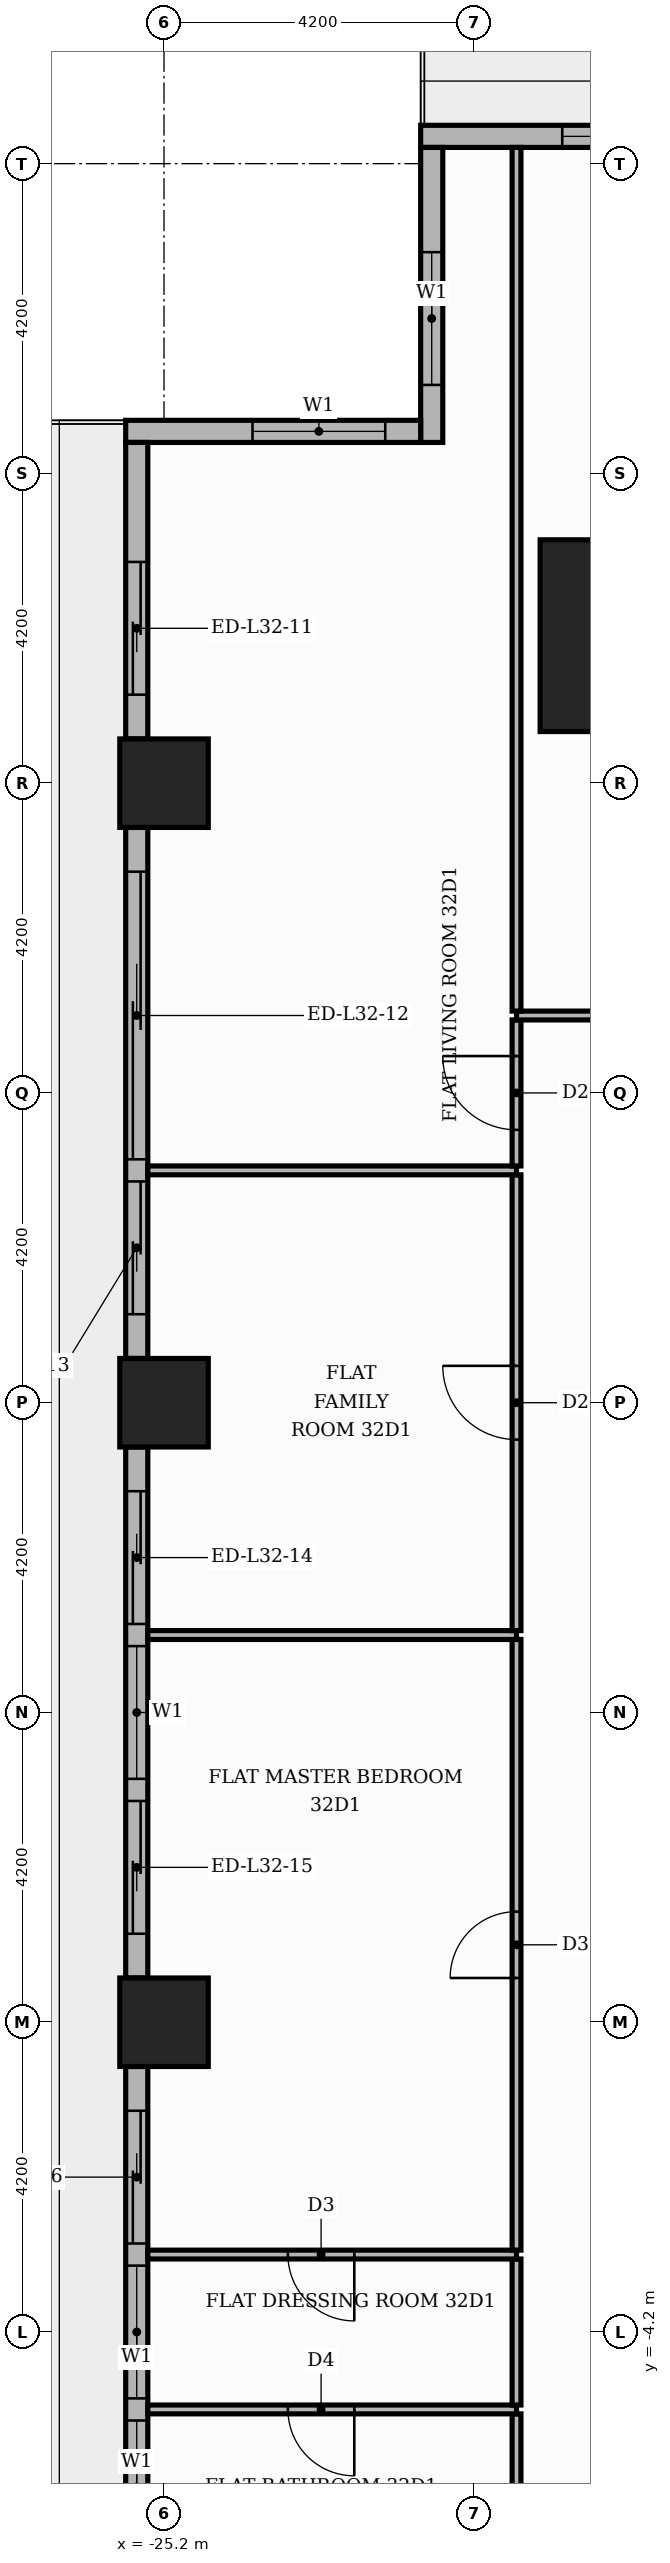
"""IFC4 building model, lengths in metres.
Left out: names, types, materials, properties, quantities, classifications, styles, units other than length and angle.
Written with IfcOpenShell. Run it as: python <this file> out.ifc"""

import sys

from ifc_helpers import new_model, si_unit, direction, frame, frame_2d, origin, origin_2d, place, context, subcontext, project, spatial, rectangle, extrude, element, fill, save


model = new_model("IFC4")
c1 = context("Model", 3, precision=1e-05, world=origin(), true_north=direction((0.0, 1.0)))
c2 = subcontext(c1, "Body", "Model", "MODEL_VIEW")
j1 = project(units=[si_unit("LENGTHUNIT", "METRE"), si_unit("PLANEANGLEUNIT", "RADIAN")], contexts=[c1])
p1 = place(None, origin())
s1 = spatial("IfcSite", under=j1, at=p1, CompositionType="ELEMENT")
p2 = place(p1, origin())
s2 = spatial("IfcBuilding", under=s1, at=p2, CompositionType="ELEMENT")
p3 = place(p2, frame((0.0, 0.0, 137.7)))
s3 = spatial("IfcBuildingStorey", under=s2, at=p3, CompositionType="ELEMENT", Elevation=137.7)
p4 = place(p3, frame((-18.8, 18.8, 0.0), z_axis=(0.0, 0.0, 1.0), x_axis=(1.0, 0.0, 0.0)))
e1 = element("IfcColumn", 1, at=p4, inside=s3, PredefinedType="COLUMN", context=c2, shape_type="SweptSolid", body=[
    extrude(rectangle(XDim=2.6, YDim=2.6, at=origin_2d()), origin(), (0.0, 0.0, 1.0), 3.9),
])
for number, where, z_axis, x_axis in (
    (2, (-25.2, 0.0, 0.0), (0.0, 0.0, 1.0), (1.0, 0.0, 0.0)),
    (3, (-25.2, 8.4, 0.0), (0.0, 0.0, 1.0), (1.0, 0.0, 0.0)),
    (4, (-25.2, 16.8, 0.0), (0.0, 0.0, 1.0), (1.0, 0.0, 0.0)),
):
    element("IfcColumn", number, at=place(p3, frame(where, z_axis=z_axis, x_axis=x_axis)), inside=s3, PredefinedType="COLUMN", context=c2, shape_type="SweptSolid", body=[
        extrude(rectangle(XDim=1.2, YDim=1.2, at=origin_2d()), origin(), (0.0, 0.0, 1.0), 3.9),
    ])
p5 = place(p3, frame((-17.4, 25.57, 0.0), z_axis=(0.0, 0.0, 1.0), x_axis=(-1.0, 0.0, 0.0)))
e5 = element("IfcWall", 5, at=p5, inside=s3, PredefinedType="STANDARD", context=c2, shape_type="SweptSolid", body=[
    extrude(rectangle(XDim=4.32, YDim=0.3, at=frame_2d((2.16, 0.0))), origin(), (0.0, 0.0, 1.0), 3.48),
])
p6 = place(p5, frame((0.6, 0.0, 0.9)))
e6 = element("IfcOpeningElement", 6, at=p6, cuts=e5, PredefinedType="OPENING", context=c2, shape_type="SweptSolid", body=[
    extrude(rectangle(XDim=1.8, YDim=2.1, at=frame_2d((0.9, 1.05))), frame((0.0, 0.16, 0.0), z_axis=(0.0, -1.0, 0.0), x_axis=(1.0, 0.0, 0.0)), (0.0, 0.0, 1.0), 0.32),
])
p7 = place(p3, frame((-21.57, 25.42, 0.0), z_axis=(0.0, 0.0, 1.0), x_axis=(0.0, -1.0, 0.0)))
e7 = element("IfcWall", 7, at=p7, inside=s3, PredefinedType="STANDARD", context=c2, shape_type="SweptSolid", body=[
    extrude(rectangle(XDim=4.0, YDim=0.3, at=frame_2d((2.0, 0.0))), origin(), (0.0, 0.0, 1.0), 3.48),
])
p8 = place(p7, frame((1.42, 0.0, 0.9)))
e8 = element("IfcOpeningElement", 8, at=p8, cuts=e7, PredefinedType="OPENING", context=c2, shape_type="SweptSolid", body=[
    extrude(rectangle(XDim=1.8, YDim=2.1, at=frame_2d((0.9, 1.05))), frame((0.0, 0.16, 0.0), z_axis=(0.0, -1.0, 0.0), x_axis=(1.0, 0.0, 0.0)), (0.0, 0.0, 1.0), 0.32),
])
p9 = place(p3, frame((-21.72, 21.57, 0.0), z_axis=(0.0, 0.0, 1.0), x_axis=(-1.0, 0.0, 0.0)))
e9 = element("IfcWall", 9, at=p9, inside=s3, PredefinedType="STANDARD", context=c2, shape_type="SweptSolid", body=[
    extrude(rectangle(XDim=4.0, YDim=0.3, at=frame_2d((2.0, 0.0))), origin(), (0.0, 0.0, 1.0), 3.48),
])
p10 = place(p9, frame((0.48, 0.0, 0.9)))
e10 = element("IfcOpeningElement", 10, at=p10, cuts=e9, PredefinedType="OPENING", context=c2, shape_type="SweptSolid", body=[
    extrude(rectangle(XDim=1.8, YDim=2.1, at=frame_2d((0.9, 1.05))), frame((0.0, 0.16, 0.0), z_axis=(0.0, -1.0, 0.0), x_axis=(1.0, 0.0, 0.0)), (0.0, 0.0, 1.0), 0.32),
])
p11 = place(p3, frame((-25.57, 21.42, 0.0), z_axis=(0.0, 0.0, 1.0), x_axis=(0.0, -1.0, 0.0)))
e11 = element("IfcWall", 11, at=p11, inside=s3, PredefinedType="STANDARD", context=c2, shape_type="SweptSolid", body=[
    extrude(rectangle(XDim=4.02, YDim=0.3, at=frame_2d((2.01, 0.0))), origin(), (0.0, 0.0, 1.0), 3.48),
])
p12 = place(p11, frame((1.62, 0.0, 0.0)))
e12 = element("IfcOpeningElement", 12, at=p12, cuts=e11, PredefinedType="OPENING", context=c2, shape_type="SweptSolid", body=[
    extrude(rectangle(XDim=1.8, YDim=2.4, at=frame_2d((0.9, 1.2))), frame((0.0, 0.16, 0.0), z_axis=(0.0, -1.0, 0.0), x_axis=(1.0, 0.0, 0.0)), (0.0, 0.0, 1.0), 0.32),
])
p13 = place(p3, frame((-25.57, 16.2, 0.0), z_axis=(0.0, 0.0, 1.0), x_axis=(0.0, -1.0, 0.0)))
e13 = element("IfcWall", 13, at=p13, inside=s3, PredefinedType="STANDARD", context=c2, shape_type="SweptSolid", body=[
    extrude(rectangle(XDim=7.2, YDim=0.3, at=frame_2d((3.6, 0.0))), origin(), (0.0, 0.0, 1.0), 3.48),
])
p14 = place(p13, frame((0.6, 0.0, 0.0)))
e14 = element("IfcOpeningElement", 14, at=p14, cuts=e13, PredefinedType="OPENING", context=c2, shape_type="SweptSolid", body=[
    extrude(rectangle(XDim=3.9, YDim=2.4, at=frame_2d((1.95, 1.2))), frame((0.0, 0.16, 0.0), z_axis=(0.0, -1.0, 0.0), x_axis=(1.0, 0.0, 0.0)), (0.0, 0.0, 1.0), 0.32),
])
p15 = place(p13, frame((4.8, 0.0, 0.0)))
e15 = element("IfcOpeningElement", 15, at=p15, cuts=e13, PredefinedType="OPENING", context=c2, shape_type="SweptSolid", body=[
    extrude(rectangle(XDim=1.8, YDim=2.4, at=frame_2d((0.9, 1.2))), frame((0.0, 0.16, 0.0), z_axis=(0.0, -1.0, 0.0), x_axis=(1.0, 0.0, 0.0)), (0.0, 0.0, 1.0), 0.32),
])
p16 = place(p3, frame((-25.57, 7.8, 0.0), z_axis=(0.0, 0.0, 1.0), x_axis=(0.0, -1.0, 0.0)))
e16 = element("IfcWall", 16, at=p16, inside=s3, PredefinedType="STANDARD", context=c2, shape_type="SweptSolid", body=[
    extrude(rectangle(XDim=7.2, YDim=0.3, at=frame_2d((3.6, 0.0))), origin(), (0.0, 0.0, 1.0), 3.48),
])
p17 = place(p16, frame((0.6, 0.0, 0.0)))
e17 = element("IfcOpeningElement", 17, at=p17, cuts=e16, PredefinedType="OPENING", context=c2, shape_type="SweptSolid", body=[
    extrude(rectangle(XDim=1.8, YDim=2.4, at=frame_2d((0.9, 1.2))), frame((0.0, 0.16, 0.0), z_axis=(0.0, -1.0, 0.0), x_axis=(1.0, 0.0, 0.0)), (0.0, 0.0, 1.0), 0.32),
])
p18 = place(p16, frame((2.7, 0.0, 0.9)))
e18 = element("IfcOpeningElement", 18, at=p18, cuts=e16, PredefinedType="OPENING", context=c2, shape_type="SweptSolid", body=[
    extrude(rectangle(XDim=1.8, YDim=2.1, at=frame_2d((0.9, 1.05))), frame((0.0, 0.16, 0.0), z_axis=(0.0, -1.0, 0.0), x_axis=(1.0, 0.0, 0.0)), (0.0, 0.0, 1.0), 0.32),
])
p19 = place(p16, frame((4.8, 0.0, 0.0)))
e19 = element("IfcOpeningElement", 19, at=p19, cuts=e16, PredefinedType="OPENING", context=c2, shape_type="SweptSolid", body=[
    extrude(rectangle(XDim=1.8, YDim=2.4, at=frame_2d((0.9, 1.2))), frame((0.0, 0.16, 0.0), z_axis=(0.0, -1.0, 0.0), x_axis=(1.0, 0.0, 0.0)), (0.0, 0.0, 1.0), 0.32),
])
p20 = place(p3, frame((-25.57, -0.6, 0.0), z_axis=(0.0, 0.0, 1.0), x_axis=(0.0, -1.0, 0.0)))
e20 = element("IfcWall", 20, at=p20, inside=s3, PredefinedType="STANDARD", context=c2, shape_type="SweptSolid", body=[
    extrude(rectangle(XDim=7.2, YDim=0.3, at=frame_2d((3.6, 0.0))), origin(), (0.0, 0.0, 1.0), 3.48),
])
p21 = place(p20, frame((0.6, 0.0, 0.0)))
e21 = element("IfcOpeningElement", 21, at=p21, cuts=e20, PredefinedType="OPENING", context=c2, shape_type="SweptSolid", body=[
    extrude(rectangle(XDim=1.8, YDim=2.4, at=frame_2d((0.9, 1.2))), frame((0.0, 0.16, 0.0), z_axis=(0.0, -1.0, 0.0), x_axis=(1.0, 0.0, 0.0)), (0.0, 0.0, 1.0), 0.32),
])
p22 = place(p20, frame((2.7, 0.0, 0.9)))
e22 = element("IfcOpeningElement", 22, at=p22, cuts=e20, PredefinedType="OPENING", context=c2, shape_type="SweptSolid", body=[
    extrude(rectangle(XDim=1.8, YDim=2.1, at=frame_2d((0.9, 1.05))), frame((0.0, 0.16, 0.0), z_axis=(0.0, -1.0, 0.0), x_axis=(1.0, 0.0, 0.0)), (0.0, 0.0, 1.0), 0.32),
])
p23 = place(p20, frame((4.8, 0.0, 0.9)))
e23 = element("IfcOpeningElement", 23, at=p23, cuts=e20, PredefinedType="OPENING", context=c2, shape_type="SweptSolid", body=[
    extrude(rectangle(XDim=1.8, YDim=2.1, at=frame_2d((0.9, 1.05))), frame((0.0, 0.16, 0.0), z_axis=(0.0, -1.0, 0.0), x_axis=(1.0, 0.0, 0.0)), (0.0, 0.0, 1.0), 0.32),
])
p24 = place(p3, frame((-20.42, -7.29, 0.0), z_axis=(0.0, 0.0, 1.0), x_axis=(0.0, 1.0, 0.0)))
e24 = element("IfcWall", 24, at=p24, inside=s3, PredefinedType="PARTITIONING", context=c2, shape_type="SweptSolid", body=[
    extrude(rectangle(XDim=1.98, YDim=0.12, at=frame_2d((0.99, 0.0))), origin(), (0.0, 0.0, 1.0), 3.48),
])
p25 = place(p3, frame((-25.42, -5.25, 0.0), z_axis=(0.0, 0.0, 1.0), x_axis=(1.0, 0.0, 0.0)))
e25 = element("IfcWall", 25, at=p25, inside=s3, PredefinedType="PARTITIONING", context=c2, shape_type="SweptSolid", body=[
    extrude(rectangle(XDim=5.0, YDim=0.12, at=frame_2d((2.5, 0.0))), origin(), (0.0, 0.0, 1.0), 3.48),
])
p26 = place(p25, frame((1.9, 0.0, 0.0)))
e26 = element("IfcOpeningElement", 26, at=p26, cuts=e25, PredefinedType="OPENING", context=c2, shape_type="SweptSolid", body=[
    extrude(rectangle(XDim=0.9, YDim=2.1, at=frame_2d((0.45, 1.05))), frame((0.0, 0.07, 0.0), z_axis=(0.0, -1.0, 0.0), x_axis=(1.0, 0.0, 0.0)), (0.0, 0.0, 1.0), 0.14),
])
p27 = place(p3, frame((-20.42, -5.19, 0.0), z_axis=(0.0, 0.0, 1.0), x_axis=(0.0, 1.0, 0.0)))
e27 = element("IfcWall", 27, at=p27, inside=s3, PredefinedType="PARTITIONING", context=c2, shape_type="SweptSolid", body=[
    extrude(rectangle(XDim=1.98, YDim=0.12, at=frame_2d((0.99, 0.0))), origin(), (0.0, 0.0, 1.0), 3.48),
])
p28 = place(p3, frame((-25.42, -3.15, 0.0), z_axis=(0.0, 0.0, 1.0), x_axis=(1.0, 0.0, 0.0)))
e28 = element("IfcWall", 28, at=p28, inside=s3, PredefinedType="PARTITIONING", context=c2, shape_type="SweptSolid", body=[
    extrude(rectangle(XDim=5.0, YDim=0.12, at=frame_2d((2.5, 0.0))), origin(), (0.0, 0.0, 1.0), 3.48),
])
p29 = place(p28, frame((1.9, 0.0, 0.0)))
e29 = element("IfcOpeningElement", 29, at=p29, cuts=e28, PredefinedType="OPENING", context=c2, shape_type="SweptSolid", body=[
    extrude(rectangle(XDim=0.9, YDim=2.1, at=frame_2d((0.45, 1.05))), frame((0.0, 0.07, 0.0), z_axis=(0.0, -1.0, 0.0), x_axis=(1.0, 0.0, 0.0)), (0.0, 0.0, 1.0), 0.14),
])
p30 = place(p3, frame((-20.42, -3.09, 0.0), z_axis=(0.0, 0.0, 1.0), x_axis=(0.0, 1.0, 0.0)))
e30 = element("IfcWall", 30, at=p30, inside=s3, PredefinedType="PARTITIONING", context=c2, shape_type="SweptSolid", body=[
    extrude(rectangle(XDim=8.28, YDim=0.12, at=frame_2d((4.14, 0.0))), origin(), (0.0, 0.0, 1.0), 3.48),
])
p31 = place(p30, frame((3.69, 0.0, 0.0)))
e31 = element("IfcOpeningElement", 31, at=p31, cuts=e30, PredefinedType="OPENING", context=c2, shape_type="SweptSolid", body=[
    extrude(rectangle(XDim=0.9, YDim=2.1, at=frame_2d((0.45, 1.05))), frame((0.0, 0.07, 0.0), z_axis=(0.0, -1.0, 0.0), x_axis=(1.0, 0.0, 0.0)), (0.0, 0.0, 1.0), 0.14),
])
p32 = place(p3, frame((-25.42, 5.25, 0.0), z_axis=(0.0, 0.0, 1.0), x_axis=(1.0, 0.0, 0.0)))
e32 = element("IfcWall", 32, at=p32, inside=s3, PredefinedType="PARTITIONING", context=c2, shape_type="SweptSolid", body=[
    extrude(rectangle(XDim=5.0, YDim=0.12, at=frame_2d((2.5, 0.0))), origin(), (0.0, 0.0, 1.0), 3.48),
])
p33 = place(p3, frame((-20.42, 5.31, 0.0), z_axis=(0.0, 0.0, 1.0), x_axis=(0.0, 1.0, 0.0)))
e33 = element("IfcWall", 33, at=p33, inside=s3, PredefinedType="PARTITIONING", context=c2, shape_type="SweptSolid", body=[
    extrude(rectangle(XDim=6.18, YDim=0.12, at=frame_2d((3.09, 0.0))), origin(), (0.0, 0.0, 1.0), 3.48),
])
p34 = place(p33, frame((2.59, 0.0, 0.0)))
e34 = element("IfcOpeningElement", 34, at=p34, cuts=e33, PredefinedType="OPENING", context=c2, shape_type="SweptSolid", body=[
    extrude(rectangle(XDim=1.0, YDim=2.1, at=frame_2d((0.5, 1.05))), frame((0.0, 0.07, 0.0), z_axis=(0.0, -1.0, 0.0), x_axis=(1.0, 0.0, 0.0)), (0.0, 0.0, 1.0), 0.14),
])
p35 = place(p3, frame((-25.42, 11.55, 0.0), z_axis=(0.0, 0.0, 1.0), x_axis=(1.0, 0.0, 0.0)))
e35 = element("IfcWall", 35, at=p35, inside=s3, PredefinedType="PARTITIONING", context=c2, shape_type="SweptSolid", body=[
    extrude(rectangle(XDim=5.0, YDim=0.12, at=frame_2d((2.5, 0.0))), origin(), (0.0, 0.0, 1.0), 3.48),
])
p36 = place(p3, frame((-20.42, 11.61, 0.0), z_axis=(0.0, 0.0, 1.0), x_axis=(0.0, 1.0, 0.0)))
e36 = element("IfcWall", 36, at=p36, inside=s3, PredefinedType="PARTITIONING", context=c2, shape_type="SweptSolid", body=[
    extrude(rectangle(XDim=1.98, YDim=0.12, at=frame_2d((0.99, 0.0))), origin(), (0.0, 0.0, 1.0), 3.48),
])
p37 = place(p36, frame((0.49, 0.0, 0.0)))
e37 = element("IfcOpeningElement", 37, at=p37, cuts=e36, PredefinedType="OPENING", context=c2, shape_type="SweptSolid", body=[
    extrude(rectangle(XDim=1.0, YDim=2.1, at=frame_2d((0.5, 1.05))), frame((0.0, 0.07, 0.0), z_axis=(0.0, -1.0, 0.0), x_axis=(1.0, 0.0, 0.0)), (0.0, 0.0, 1.0), 0.14),
])
p38 = place(p3, frame((-20.42, 13.65, 0.0), z_axis=(0.0, 0.0, 1.0), x_axis=(1.0, 0.0, 0.0)))
e38 = element("IfcWall", 38, at=p38, inside=s3, PredefinedType="PARTITIONING", context=c2, shape_type="SweptSolid", body=[
    extrude(rectangle(XDim=6.77, YDim=0.12, at=frame_2d((3.385, 0.0))), origin(), (0.0, 0.0, 1.0), 3.48),
])
p39 = place(p38, frame((2.935, 0.0, 0.0)))
e39 = element("IfcOpeningElement", 39, at=p39, cuts=e38, PredefinedType="OPENING", context=c2, shape_type="SweptSolid", body=[
    extrude(rectangle(XDim=0.9, YDim=2.1, at=frame_2d((0.45, 1.05))), frame((0.0, 0.07, 0.0), z_axis=(0.0, -1.0, 0.0), x_axis=(1.0, 0.0, 0.0)), (0.0, 0.0, 1.0), 0.14),
])
p40 = place(p3, frame((-20.42, 13.71, 0.0), z_axis=(0.0, 0.0, 1.0), x_axis=(0.0, 1.0, 0.0)))
e40 = element("IfcWall", 40, at=p40, inside=s3, PredefinedType="PARTITIONING", context=c2, shape_type="SweptSolid", body=[
    extrude(rectangle(XDim=11.71, YDim=0.12, at=frame_2d((5.855, 0.0))), origin(), (0.0, 0.0, 1.0), 3.48),
])
p41 = place(p6, origin())
e41 = element("IfcWindow", 41, at=p41, inside=s3, PartitioningType="SINGLE_PANEL", PredefinedType="WINDOW", context=c2, shape_type="SweptSolid", body=[
    extrude(rectangle(XDim=1.8, YDim=2.1, at=frame_2d((0.9, 1.05))), frame((0.0, 0.03, 0.0), z_axis=(0.0, -1.0, 0.0), x_axis=(1.0, 0.0, 0.0)), (0.0, 0.0, 1.0), 0.06),
])
fill(e6, e41)
p42 = place(p8, origin())
e42 = element("IfcWindow", 42, at=p42, inside=s3, PartitioningType="SINGLE_PANEL", PredefinedType="WINDOW", context=c2, shape_type="SweptSolid", body=[
    extrude(rectangle(XDim=1.8, YDim=2.1, at=frame_2d((0.9, 1.05))), frame((0.0, 0.03, 0.0), z_axis=(0.0, -1.0, 0.0), x_axis=(1.0, 0.0, 0.0)), (0.0, 0.0, 1.0), 0.06),
])
fill(e8, e42)
p43 = place(p10, origin())
e43 = element("IfcWindow", 43, at=p43, inside=s3, PartitioningType="SINGLE_PANEL", PredefinedType="WINDOW", context=c2, shape_type="SweptSolid", body=[
    extrude(rectangle(XDim=1.8, YDim=2.1, at=frame_2d((0.9, 1.05))), frame((0.0, 0.03, 0.0), z_axis=(0.0, -1.0, 0.0), x_axis=(1.0, 0.0, 0.0)), (0.0, 0.0, 1.0), 0.06),
])
fill(e10, e43)
p44 = place(p12, origin())
e44 = element("IfcDoor", 44, at=p44, inside=s3, OperationType="SLIDING_TO_RIGHT", PredefinedType="DOOR", context=c2, shape_type="SweptSolid", body=[
    extrude(rectangle(XDim=1.8, YDim=2.4, at=frame_2d((0.9, 1.2))), frame((0.0, 0.025, 0.0), z_axis=(0.0, -1.0, 0.0), x_axis=(1.0, 0.0, 0.0)), (0.0, 0.0, 1.0), 0.05),
])
fill(e12, e44)
p45 = place(p14, origin())
e45 = element("IfcDoor", 45, at=p45, inside=s3, OperationType="SLIDING_TO_LEFT", PredefinedType="DOOR", context=c2, shape_type="SweptSolid", body=[
    extrude(rectangle(XDim=3.9, YDim=2.4, at=frame_2d((1.95, 1.2))), frame((0.0, 0.025, 0.0), z_axis=(0.0, -1.0, 0.0), x_axis=(1.0, 0.0, 0.0)), (0.0, 0.0, 1.0), 0.05),
])
fill(e14, e45)
p46 = place(p15, origin())
e46 = element("IfcDoor", 46, at=p46, inside=s3, OperationType="SLIDING_TO_RIGHT", PredefinedType="DOOR", context=c2, shape_type="SweptSolid", body=[
    extrude(rectangle(XDim=1.8, YDim=2.4, at=frame_2d((0.9, 1.2))), frame((0.0, 0.025, 0.0), z_axis=(0.0, -1.0, 0.0), x_axis=(1.0, 0.0, 0.0)), (0.0, 0.0, 1.0), 0.05),
])
fill(e15, e46)
p47 = place(p17, origin())
e47 = element("IfcDoor", 47, at=p47, inside=s3, OperationType="SLIDING_TO_LEFT", PredefinedType="DOOR", context=c2, shape_type="SweptSolid", body=[
    extrude(rectangle(XDim=1.8, YDim=2.4, at=frame_2d((0.9, 1.2))), frame((0.0, 0.025, 0.0), z_axis=(0.0, -1.0, 0.0), x_axis=(1.0, 0.0, 0.0)), (0.0, 0.0, 1.0), 0.05),
])
fill(e17, e47)
p48 = place(p18, origin())
e48 = element("IfcWindow", 48, at=p48, inside=s3, PartitioningType="SINGLE_PANEL", PredefinedType="WINDOW", context=c2, shape_type="SweptSolid", body=[
    extrude(rectangle(XDim=1.8, YDim=2.1, at=frame_2d((0.9, 1.05))), frame((0.0, 0.03, 0.0), z_axis=(0.0, -1.0, 0.0), x_axis=(1.0, 0.0, 0.0)), (0.0, 0.0, 1.0), 0.06),
])
fill(e18, e48)
p49 = place(p19, origin())
e49 = element("IfcDoor", 49, at=p49, inside=s3, OperationType="SLIDING_TO_RIGHT", PredefinedType="DOOR", context=c2, shape_type="SweptSolid", body=[
    extrude(rectangle(XDim=1.8, YDim=2.4, at=frame_2d((0.9, 1.2))), frame((0.0, 0.025, 0.0), z_axis=(0.0, -1.0, 0.0), x_axis=(1.0, 0.0, 0.0)), (0.0, 0.0, 1.0), 0.05),
])
fill(e19, e49)
p50 = place(p21, origin())
e50 = element("IfcDoor", 50, at=p50, inside=s3, OperationType="SLIDING_TO_LEFT", PredefinedType="DOOR", context=c2, shape_type="SweptSolid", body=[
    extrude(rectangle(XDim=1.8, YDim=2.4, at=frame_2d((0.9, 1.2))), frame((0.0, 0.025, 0.0), z_axis=(0.0, -1.0, 0.0), x_axis=(1.0, 0.0, 0.0)), (0.0, 0.0, 1.0), 0.05),
])
fill(e21, e50)
p51 = place(p22, origin())
e51 = element("IfcWindow", 51, at=p51, inside=s3, PartitioningType="SINGLE_PANEL", PredefinedType="WINDOW", context=c2, shape_type="SweptSolid", body=[
    extrude(rectangle(XDim=1.8, YDim=2.1, at=frame_2d((0.9, 1.05))), frame((0.0, 0.03, 0.0), z_axis=(0.0, -1.0, 0.0), x_axis=(1.0, 0.0, 0.0)), (0.0, 0.0, 1.0), 0.06),
])
fill(e22, e51)
p52 = place(p23, origin())
e52 = element("IfcWindow", 52, at=p52, inside=s3, PartitioningType="SINGLE_PANEL", PredefinedType="WINDOW", context=c2, shape_type="SweptSolid", body=[
    extrude(rectangle(XDim=1.8, YDim=2.1, at=frame_2d((0.9, 1.05))), frame((0.0, 0.03, 0.0), z_axis=(0.0, -1.0, 0.0), x_axis=(1.0, 0.0, 0.0)), (0.0, 0.0, 1.0), 0.06),
])
fill(e23, e52)
p53 = place(p37, origin())
e53 = element("IfcDoor", 53, at=p53, inside=s3, OperationType="SINGLE_SWING_RIGHT", PredefinedType="DOOR", context=c2, shape_type="SweptSolid", body=[
    extrude(rectangle(XDim=1.0, YDim=2.1, at=frame_2d((0.5, 1.05))), frame((0.0, 0.025, 0.0), z_axis=(0.0, -1.0, 0.0), x_axis=(1.0, 0.0, 0.0)), (0.0, 0.0, 1.0), 0.05),
])
fill(e37, e53)
p54 = place(p34, origin())
e54 = element("IfcDoor", 54, at=p54, inside=s3, OperationType="SINGLE_SWING_RIGHT", PredefinedType="DOOR", context=c2, shape_type="SweptSolid", body=[
    extrude(rectangle(XDim=1.0, YDim=2.1, at=frame_2d((0.5, 1.05))), frame((0.0, 0.025, 0.0), z_axis=(0.0, -1.0, 0.0), x_axis=(1.0, 0.0, 0.0)), (0.0, 0.0, 1.0), 0.05),
])
fill(e34, e54)
p55 = place(p31, origin())
e55 = element("IfcDoor", 55, at=p55, inside=s3, OperationType="SINGLE_SWING_LEFT", PredefinedType="DOOR", context=c2, shape_type="SweptSolid", body=[
    extrude(rectangle(XDim=0.9, YDim=2.1, at=frame_2d((0.45, 1.05))), frame((0.0, 0.025, 0.0), z_axis=(0.0, -1.0, 0.0), x_axis=(1.0, 0.0, 0.0)), (0.0, 0.0, 1.0), 0.05),
])
fill(e31, e55)
p56 = place(p29, frame((0.9, 0.0, 0.0), z_axis=(0.0, 0.0, 1.0), x_axis=(-1.0, 0.0, 0.0)))
e56 = element("IfcDoor", 56, at=p56, inside=s3, OperationType="SINGLE_SWING_RIGHT", PredefinedType="DOOR", context=c2, shape_type="SweptSolid", body=[
    extrude(rectangle(XDim=0.9, YDim=2.1, at=frame_2d((0.45, 1.05))), frame((0.0, 0.025, 0.0), z_axis=(0.0, -1.0, 0.0), x_axis=(1.0, 0.0, 0.0)), (0.0, 0.0, 1.0), 0.05),
])
fill(e29, e56)
p57 = place(p26, frame((0.9, 0.0, 0.0), z_axis=(0.0, 0.0, 1.0), x_axis=(-1.0, 0.0, 0.0)))
e57 = element("IfcDoor", 57, at=p57, inside=s3, OperationType="SINGLE_SWING_RIGHT", PredefinedType="DOOR", context=c2, shape_type="SweptSolid", body=[
    extrude(rectangle(XDim=0.9, YDim=2.1, at=frame_2d((0.45, 1.05))), frame((0.0, 0.025, 0.0), z_axis=(0.0, -1.0, 0.0), x_axis=(1.0, 0.0, 0.0)), (0.0, 0.0, 1.0), 0.05),
])
fill(e26, e57)
save(model, sys.argv[1])
